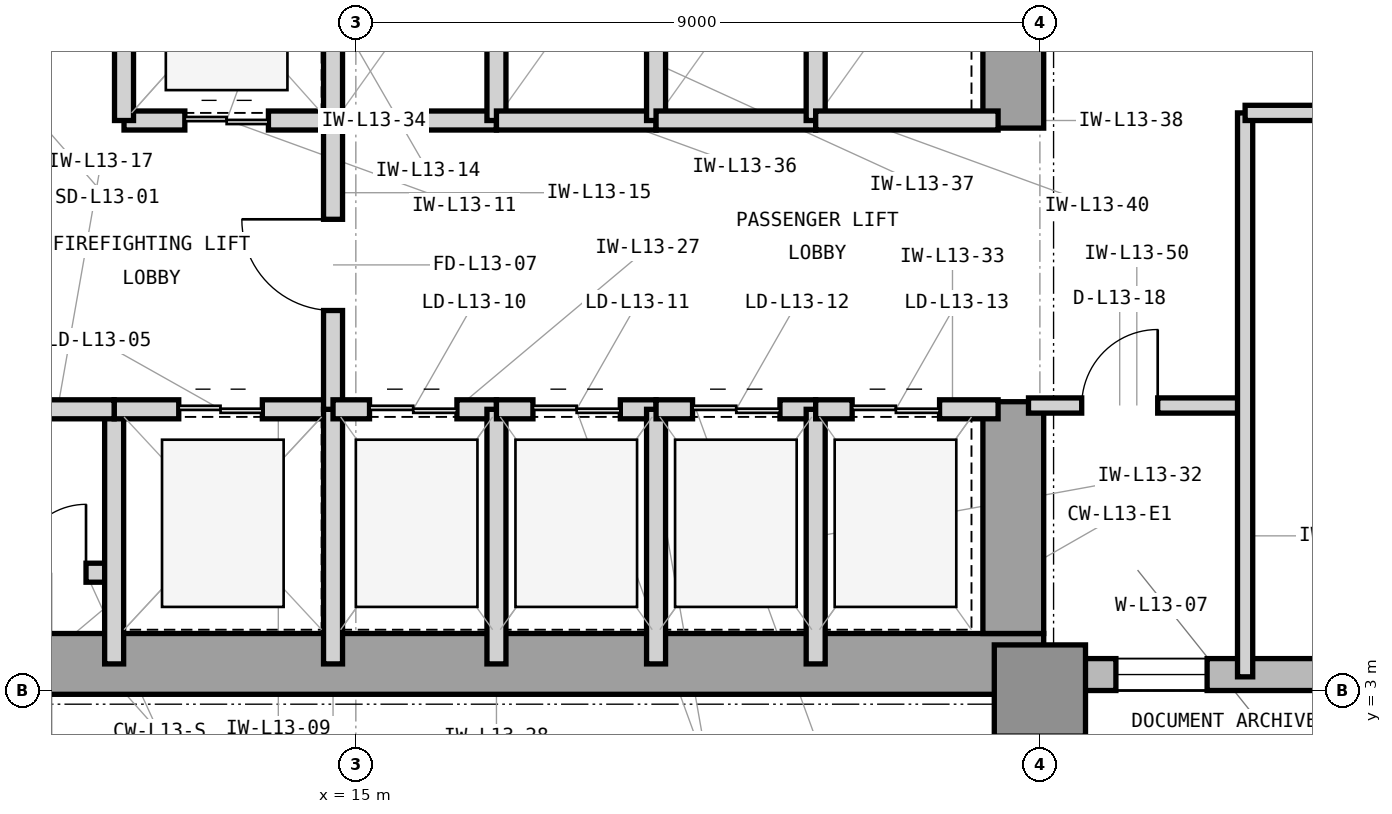
"""IFC4 building model, lengths in metres.
Left out: names, types, materials, properties, quantities, classifications, styles, units other than length and angle.
Written with IfcOpenShell. Run it as: python <this file> out.ifc"""

import sys

from ifc_helpers import new_model, si_unit, direction, frame, frame_2d, origin, origin_2d, place, context, subcontext, project, spatial, rectangle, extrude, element, fill, save


model = new_model("IFC4")
c1 = context("Model", 3, precision=1e-05, world=origin(), true_north=direction((0.0, 1.0)))
c2 = subcontext(c1, "Body", "Model", "MODEL_VIEW")
j1 = project(units=[si_unit("LENGTHUNIT", "METRE"), si_unit("PLANEANGLEUNIT", "RADIAN")], contexts=[c1])
p1 = place(None, origin())
s1 = spatial("IfcSite", under=j1, at=p1, CompositionType="ELEMENT")
p2 = place(p1, origin())
s2 = spatial("IfcBuilding", under=s1, at=p2, CompositionType="ELEMENT")
p3 = place(p2, frame((0.0, 0.0, 59.4)))
s3 = spatial("IfcBuildingStorey", under=s2, at=p3, CompositionType="ELEMENT", Elevation=59.4)
p4 = place(p3, frame((7.475, 3.35, 0.0), z_axis=(0.0, 0.0, 1.0), x_axis=(1.0, 0.0, 0.0)))
e1 = element("IfcWall", 1, at=p4, inside=s3, PredefinedType="SHEAR", context=c2, shape_type="SweptSolid", body=[
    extrude(rectangle(XDim=16.575, YDim=0.8, at=frame_2d((8.288, 0.0))), origin(), (0.0, 0.0, 1.0), 4.2),
])
p5 = place(p3, frame((23.65, 3.75, 0.0), z_axis=(0.0, 0.0, 1.0), x_axis=(0.0, 1.0, 0.0)))
e2 = element("IfcWall", 2, at=p5, inside=s3, PredefinedType="SHEAR", context=c2, shape_type="SweptSolid", body=[
    extrude(rectangle(XDim=3.05, YDim=0.8, at=frame_2d((1.525, 0.0))), origin(), (0.0, 0.0, 1.0), 4.2),
])
p6 = place(p3, frame((23.65, 10.4, 0.0), z_axis=(0.0, 0.0, 1.0), x_axis=(0.0, 1.0, 0.0)))
e3 = element("IfcWall", 3, at=p6, inside=s3, PredefinedType="SHEAR", context=c2, shape_type="SweptSolid", body=[
    extrude(rectangle(XDim=3.2, YDim=0.8, at=frame_2d((1.6, 0.0))), origin(), (0.0, 0.0, 1.0), 4.2),
])
p7 = place(p3, frame((24.0, 3.0, 0.0), z_axis=(0.0, 0.0, 1.0), x_axis=(1.0, 0.0, 0.0)))
e4 = element("IfcColumn", 4, at=p7, inside=s3, PredefinedType="COLUMN", context=c2, shape_type="SweptSolid", body=[
    extrude(rectangle(XDim=1.2, YDim=1.2, at=origin_2d()), origin(), (0.0, 0.0, 1.0), 4.2),
])
p8 = place(p3, frame((23.9, 3.21, 0.0), z_axis=(0.0, 0.0, 1.0), x_axis=(1.0, 0.0, 0.0)))
e5 = element("IfcWall", 5, at=p8, inside=s3, PredefinedType="STANDARD", context=c2, shape_type="SweptSolid", body=[
    extrude(rectangle(XDim=40.5, YDim=0.42, at=frame_2d((20.25, 0.0))), origin(), (0.0, 0.0, 1.0), 3.98),
])
p9 = place(p8, frame((1.1, 0.0, 0.85)))
e6 = element("IfcOpeningElement", 6, at=p9, cuts=e5, PredefinedType="OPENING", context=c2, shape_type="SweptSolid", body=[
    extrude(rectangle(XDim=1.2, YDim=2.45, at=frame_2d((0.6, 1.225))), frame((0.0, 0.22, 0.0), z_axis=(0.0, -1.0, 0.0), x_axis=(1.0, 0.0, 0.0)), (0.0, 0.0, 1.0), 0.44),
])
p10 = place(p8, frame((5.336, 0.0, 0.85)))
e7 = element("IfcOpeningElement", 7, at=p10, cuts=e5, PredefinedType="OPENING", context=c2, shape_type="SweptSolid", body=[
    extrude(rectangle(XDim=2.8, YDim=2.45, at=frame_2d((1.4, 1.225))), frame((0.0, 0.22, 0.0), z_axis=(0.0, -1.0, 0.0), x_axis=(1.0, 0.0, 0.0)), (0.0, 0.0, 1.0), 0.44),
])
p11 = place(p8, frame((19.086, 0.0, 0.85)))
e8 = element("IfcOpeningElement", 8, at=p11, cuts=e5, PredefinedType="OPENING", context=c2, shape_type="SweptSolid", body=[
    extrude(rectangle(XDim=2.8, YDim=2.45, at=frame_2d((1.4, 1.225))), frame((0.0, 0.22, 0.0), z_axis=(0.0, -1.0, 0.0), x_axis=(1.0, 0.0, 0.0)), (0.0, 0.0, 1.0), 0.44),
])
p12 = place(p8, frame((27.886, 0.0, 0.85)))
e9 = element("IfcOpeningElement", 9, at=p12, cuts=e5, PredefinedType="OPENING", context=c2, shape_type="SweptSolid", body=[
    extrude(rectangle(XDim=1.2, YDim=2.45, at=frame_2d((0.6, 1.225))), frame((0.0, 0.22, 0.0), z_axis=(0.0, -1.0, 0.0), x_axis=(1.0, 0.0, 0.0)), (0.0, 0.0, 1.0), 0.44),
])
p13 = place(p3, frame((10.33, 4.55, 0.0), z_axis=(0.0, 0.0, 1.0), x_axis=(1.0, 0.0, 0.0)))
e10 = element("IfcWall", 10, at=p13, inside=s3, PredefinedType="PARTITIONING", context=c2, shape_type="SweptSolid", body=[
    extrude(rectangle(XDim=1.49, YDim=0.25, at=frame_2d((0.745, 0.0))), origin(), (0.0, 0.0, 1.0), 3.97),
])
p14 = place(p13, frame((0.22, 0.0, 0.0)))
e11 = element("IfcOpeningElement", 11, at=p14, cuts=e10, PredefinedType="OPENING", context=c2, shape_type="SweptSolid", body=[
    extrude(rectangle(XDim=0.9, YDim=2.1, at=frame_2d((0.45, 1.05))), frame((0.0, 0.135, 0.0), z_axis=(0.0, -1.0, 0.0), x_axis=(1.0, 0.0, 0.0)), (0.0, 0.0, 1.0), 0.27),
])
p15 = place(p3, frame((11.82, 3.35, 0.0), z_axis=(0.0, 0.0, 1.0), x_axis=(0.0, 1.0, 0.0)))
e12 = element("IfcWall", 12, at=p15, inside=s3, PredefinedType="PARTITIONING", context=c2, shape_type="SweptSolid", body=[
    extrude(rectangle(XDim=3.35, YDim=0.25, at=frame_2d((1.675, 0.0))), origin(), (0.0, 0.0, 1.0), 3.97),
])
p16 = place(p3, frame((11.82, 6.7, 0.0), z_axis=(0.0, 0.0, 1.0), x_axis=(1.0, 0.0, 0.0)))
e13 = element("IfcWall", 13, at=p16, inside=s3, PredefinedType="PARTITIONING", context=c2, shape_type="SweptSolid", body=[
    extrude(rectangle(XDim=2.88, YDim=0.25, at=frame_2d((1.44, 0.0))), origin(), (0.0, 0.0, 1.0), 3.426),
])
p17 = place(p16, frame((0.85, 0.0, 0.0)))
e14 = element("IfcOpeningElement", 14, at=p17, cuts=e13, PredefinedType="OPENING", context=c2, shape_type="SweptSolid", body=[
    extrude(rectangle(XDim=1.1, YDim=2.25, at=frame_2d((0.55, 1.125))), frame((0.0, 0.135, 0.0), z_axis=(0.0, -1.0, 0.0), x_axis=(1.0, 0.0, 0.0)), (0.0, 0.0, 1.0), 0.27),
])
p18 = place(p3, frame((14.7, 3.35, 0.0), z_axis=(0.0, 0.0, 1.0), x_axis=(0.0, 1.0, 0.0)))
e15 = element("IfcWall", 15, at=p18, inside=s3, PredefinedType="PARTITIONING", context=c2, shape_type="SweptSolid", body=[
    extrude(rectangle(XDim=3.35, YDim=0.25, at=frame_2d((1.675, 0.0))), origin(), (0.0, 0.0, 1.0), 3.97),
])
p19 = place(p3, frame((11.95, 10.5, 0.0), z_axis=(0.0, 0.0, 1.0), x_axis=(1.0, 0.0, 0.0)))
e16 = element("IfcWall", 16, at=p19, inside=s3, PredefinedType="PARTITIONING", context=c2, shape_type="SweptSolid", body=[
    extrude(rectangle(XDim=2.75, YDim=0.25, at=frame_2d((1.375, 0.0))), origin(), (0.0, 0.0, 1.0), 3.426),
])
p20 = place(p19, frame((0.8, 0.0, 0.0)))
e17 = element("IfcOpeningElement", 17, at=p20, cuts=e16, PredefinedType="OPENING", context=c2, shape_type="SweptSolid", body=[
    extrude(rectangle(XDim=1.1, YDim=2.25, at=frame_2d((0.55, 1.125))), frame((0.0, 0.135, 0.0), z_axis=(0.0, -1.0, 0.0), x_axis=(1.0, 0.0, 0.0)), (0.0, 0.0, 1.0), 0.27),
])
for number, where, z_axis, x_axis in (
    (18, (11.95, 10.5, 0.0), (0.0, 0.0, 1.0), (0.0, 1.0, 0.0)),
    (19, (14.7, 10.5, 0.0), (0.0, 0.0, 1.0), (0.0, 1.0, 0.0)),
):
    element("IfcWall", number, at=place(p3, frame(where, z_axis=z_axis, x_axis=x_axis)), inside=s3, PredefinedType="PARTITIONING", context=c2, shape_type="SweptSolid", body=[
        extrude(rectangle(XDim=3.0, YDim=0.25, at=frame_2d((1.5, 0.0))), origin(), (0.0, 0.0, 1.0), 3.97),
    ])
p21 = place(p3, frame((14.7, 6.7, 0.0), z_axis=(0.0, 0.0, 1.0), x_axis=(0.0, 1.0, 0.0)))
e20 = element("IfcWall", 20, at=p21, inside=s3, PredefinedType="PARTITIONING", context=c2, shape_type="SweptSolid", body=[
    extrude(rectangle(XDim=3.8, YDim=0.25, at=frame_2d((1.9, 0.0))), origin(), (0.0, 0.0, 1.0), 3.97),
])
p22 = place(p21, frame((1.3, 0.0, 0.0)))
e21 = element("IfcOpeningElement", 21, at=p22, cuts=e20, PredefinedType="OPENING", context=c2, shape_type="SweptSolid", body=[
    extrude(rectangle(XDim=1.2, YDim=2.2, at=frame_2d((0.6, 1.1))), frame((0.0, 0.135, 0.0), z_axis=(0.0, -1.0, 0.0), x_axis=(1.0, 0.0, 0.0)), (0.0, 0.0, 1.0), 0.27),
])
p23 = place(p3, frame((10.33, 6.7, 0.0), z_axis=(0.0, 0.0, 1.0), x_axis=(1.0, 0.0, 0.0)))
e22 = element("IfcWall", 22, at=p23, inside=s3, PredefinedType="PARTITIONING", context=c2, shape_type="SweptSolid", body=[
    extrude(rectangle(XDim=1.49, YDim=0.25, at=frame_2d((0.745, 0.0))), origin(), (0.0, 0.0, 1.0), 3.426),
])
p24 = place(p3, frame((14.7, 6.7, 0.0), z_axis=(0.0, 0.0, 1.0), x_axis=(1.0, 0.0, 0.0)))
e23 = element("IfcWall", 23, at=p24, inside=s3, PredefinedType="PARTITIONING", context=c2, shape_type="SweptSolid", body=[
    extrude(rectangle(XDim=2.15, YDim=0.25, at=frame_2d((1.075, 0.0))), origin(), (0.0, 0.0, 1.0), 3.426),
])
p25 = place(p24, frame((0.48, 0.0, 0.0)))
e24 = element("IfcOpeningElement", 24, at=p25, cuts=e23, PredefinedType="OPENING", context=c2, shape_type="SweptSolid", body=[
    extrude(rectangle(XDim=1.15, YDim=2.25, at=frame_2d((0.575, 1.125))), frame((0.0, 0.135, 0.0), z_axis=(0.0, -1.0, 0.0), x_axis=(1.0, 0.0, 0.0)), (0.0, 0.0, 1.0), 0.27),
])
p26 = place(p3, frame((16.85, 3.35, 0.0), z_axis=(0.0, 0.0, 1.0), x_axis=(0.0, 1.0, 0.0)))
e25 = element("IfcWall", 25, at=p26, inside=s3, PredefinedType="PARTITIONING", context=c2, shape_type="SweptSolid", body=[
    extrude(rectangle(XDim=3.35, YDim=0.25, at=frame_2d((1.675, 0.0))), origin(), (0.0, 0.0, 1.0), 3.97),
])
p27 = place(p3, frame((16.85, 6.7, 0.0), z_axis=(0.0, 0.0, 1.0), x_axis=(1.0, 0.0, 0.0)))
e26 = element("IfcWall", 26, at=p27, inside=s3, PredefinedType="PARTITIONING", context=c2, shape_type="SweptSolid", body=[
    extrude(rectangle(XDim=2.1, YDim=0.25, at=frame_2d((1.05, 0.0))), origin(), (0.0, 0.0, 1.0), 3.426),
])
p28 = place(p27, frame((0.48, 0.0, 0.0)))
e27 = element("IfcOpeningElement", 27, at=p28, cuts=e26, PredefinedType="OPENING", context=c2, shape_type="SweptSolid", body=[
    extrude(rectangle(XDim=1.15, YDim=2.25, at=frame_2d((0.575, 1.125))), frame((0.0, 0.135, 0.0), z_axis=(0.0, -1.0, 0.0), x_axis=(1.0, 0.0, 0.0)), (0.0, 0.0, 1.0), 0.27),
])
p29 = place(p3, frame((18.95, 3.35, 0.0), z_axis=(0.0, 0.0, 1.0), x_axis=(0.0, 1.0, 0.0)))
e28 = element("IfcWall", 28, at=p29, inside=s3, PredefinedType="PARTITIONING", context=c2, shape_type="SweptSolid", body=[
    extrude(rectangle(XDim=3.35, YDim=0.25, at=frame_2d((1.675, 0.0))), origin(), (0.0, 0.0, 1.0), 3.97),
])
p30 = place(p3, frame((18.95, 6.7, 0.0), z_axis=(0.0, 0.0, 1.0), x_axis=(1.0, 0.0, 0.0)))
e29 = element("IfcWall", 29, at=p30, inside=s3, PredefinedType="PARTITIONING", context=c2, shape_type="SweptSolid", body=[
    extrude(rectangle(XDim=2.1, YDim=0.25, at=frame_2d((1.05, 0.0))), origin(), (0.0, 0.0, 1.0), 3.426),
])
p31 = place(p30, frame((0.48, 0.0, 0.0)))
e30 = element("IfcOpeningElement", 30, at=p31, cuts=e29, PredefinedType="OPENING", context=c2, shape_type="SweptSolid", body=[
    extrude(rectangle(XDim=1.15, YDim=2.25, at=frame_2d((0.575, 1.125))), frame((0.0, 0.135, 0.0), z_axis=(0.0, -1.0, 0.0), x_axis=(1.0, 0.0, 0.0)), (0.0, 0.0, 1.0), 0.27),
])
p32 = place(p3, frame((21.05, 3.35, 0.0), z_axis=(0.0, 0.0, 1.0), x_axis=(0.0, 1.0, 0.0)))
e31 = element("IfcWall", 31, at=p32, inside=s3, PredefinedType="PARTITIONING", context=c2, shape_type="SweptSolid", body=[
    extrude(rectangle(XDim=3.35, YDim=0.25, at=frame_2d((1.675, 0.0))), origin(), (0.0, 0.0, 1.0), 3.97),
])
p33 = place(p3, frame((21.05, 6.7, 0.0), z_axis=(0.0, 0.0, 1.0), x_axis=(1.0, 0.0, 0.0)))
e32 = element("IfcWall", 32, at=p33, inside=s3, PredefinedType="PARTITIONING", context=c2, shape_type="SweptSolid", body=[
    extrude(rectangle(XDim=2.4, YDim=0.25, at=frame_2d((1.2, 0.0))), origin(), (0.0, 0.0, 1.0), 3.426),
])
p34 = place(p33, frame((0.48, 0.0, 0.0)))
e33 = element("IfcOpeningElement", 33, at=p34, cuts=e32, PredefinedType="OPENING", context=c2, shape_type="SweptSolid", body=[
    extrude(rectangle(XDim=1.15, YDim=2.25, at=frame_2d((0.575, 1.125))), frame((0.0, 0.135, 0.0), z_axis=(0.0, -1.0, 0.0), x_axis=(1.0, 0.0, 0.0)), (0.0, 0.0, 1.0), 0.27),
])
p35 = place(p3, frame((14.7, 10.5, 0.0), z_axis=(0.0, 0.0, 1.0), x_axis=(1.0, 0.0, 0.0)))
e34 = element("IfcWall", 34, at=p35, inside=s3, PredefinedType="PARTITIONING", context=c2, shape_type="SweptSolid", body=[
    extrude(rectangle(XDim=2.15, YDim=0.25, at=frame_2d((1.075, 0.0))), origin(), (0.0, 0.0, 1.0), 3.426),
])
p36 = place(p3, frame((16.85, 10.5, 0.0), z_axis=(0.0, 0.0, 1.0), x_axis=(0.0, 1.0, 0.0)))
e35 = element("IfcWall", 35, at=p36, inside=s3, PredefinedType="PARTITIONING", context=c2, shape_type="SweptSolid", body=[
    extrude(rectangle(XDim=3.0, YDim=0.25, at=frame_2d((1.5, 0.0))), origin(), (0.0, 0.0, 1.0), 3.97),
])
p37 = place(p3, frame((16.85, 10.5, 0.0), z_axis=(0.0, 0.0, 1.0), x_axis=(1.0, 0.0, 0.0)))
e36 = element("IfcWall", 36, at=p37, inside=s3, PredefinedType="PARTITIONING", context=c2, shape_type="SweptSolid", body=[
    extrude(rectangle(XDim=2.1, YDim=0.25, at=frame_2d((1.05, 0.0))), origin(), (0.0, 0.0, 1.0), 3.426),
])
p38 = place(p3, frame((18.95, 10.5, 0.0), z_axis=(0.0, 0.0, 1.0), x_axis=(0.0, 1.0, 0.0)))
e37 = element("IfcWall", 37, at=p38, inside=s3, PredefinedType="PARTITIONING", context=c2, shape_type="SweptSolid", body=[
    extrude(rectangle(XDim=3.0, YDim=0.25, at=frame_2d((1.5, 0.0))), origin(), (0.0, 0.0, 1.0), 3.97),
])
p39 = place(p3, frame((18.95, 10.5, 0.0), z_axis=(0.0, 0.0, 1.0), x_axis=(1.0, 0.0, 0.0)))
e38 = element("IfcWall", 38, at=p39, inside=s3, PredefinedType="PARTITIONING", context=c2, shape_type="SweptSolid", body=[
    extrude(rectangle(XDim=2.1, YDim=0.25, at=frame_2d((1.05, 0.0))), origin(), (0.0, 0.0, 1.0), 3.426),
])
p40 = place(p3, frame((21.05, 10.5, 0.0), z_axis=(0.0, 0.0, 1.0), x_axis=(0.0, 1.0, 0.0)))
e39 = element("IfcWall", 39, at=p40, inside=s3, PredefinedType="PARTITIONING", context=c2, shape_type="SweptSolid", body=[
    extrude(rectangle(XDim=3.0, YDim=0.25, at=frame_2d((1.5, 0.0))), origin(), (0.0, 0.0, 1.0), 3.97),
])
p41 = place(p3, frame((21.05, 10.5, 0.0), z_axis=(0.0, 0.0, 1.0), x_axis=(1.0, 0.0, 0.0)))
e40 = element("IfcWall", 40, at=p41, inside=s3, PredefinedType="PARTITIONING", context=c2, shape_type="SweptSolid", body=[
    extrude(rectangle(XDim=2.4, YDim=0.25, at=frame_2d((1.2, 0.0))), origin(), (0.0, 0.0, 1.0), 3.426),
])
p42 = place(p3, frame((23.85, 6.75, 0.0), z_axis=(0.0, 0.0, 1.0), x_axis=(1.0, 0.0, 0.0)))
e41 = element("IfcWall", 41, at=p42, inside=s3, PredefinedType="PARTITIONING", context=c2, shape_type="SweptSolid", body=[
    extrude(rectangle(XDim=2.85, YDim=0.2, at=frame_2d((1.425, 0.0))), origin(), (0.0, 0.0, 1.0), 3.97),
])
p43 = place(p42, frame((0.7, 0.0, 0.0)))
e42 = element("IfcOpeningElement", 42, at=p43, cuts=e41, PredefinedType="OPENING", context=c2, shape_type="SweptSolid", body=[
    extrude(rectangle(XDim=1.0, YDim=2.15, at=frame_2d((0.5, 1.075))), frame((0.0, 0.11, 0.0), z_axis=(0.0, -1.0, 0.0), x_axis=(1.0, 0.0, 0.0)), (0.0, 0.0, 1.0), 0.22),
])
p44 = place(p3, frame((26.7, 3.18, 0.0), z_axis=(0.0, 0.0, 1.0), x_axis=(0.0, 1.0, 0.0)))
e43 = element("IfcWall", 43, at=p44, inside=s3, PredefinedType="PARTITIONING", context=c2, shape_type="SweptSolid", body=[
    extrude(rectangle(XDim=7.42, YDim=0.2, at=frame_2d((3.71, 0.0))), origin(), (0.0, 0.0, 1.0), 3.97),
])
p45 = place(p3, frame((26.7, 10.6, 0.0), z_axis=(0.0, 0.0, 1.0), x_axis=(1.0, 0.0, 0.0)))
e44 = element("IfcWall", 44, at=p45, inside=s3, PredefinedType="PARTITIONING", context=c2, shape_type="SweptSolid", body=[
    extrude(rectangle(XDim=12.0, YDim=0.2, at=frame_2d((6.0, 0.0))), origin(), (0.0, 0.0, 1.0), 3.97),
])
p46 = place(p45, frame((5.0, 0.0, 0.0)))
e45 = element("IfcOpeningElement", 45, at=p46, cuts=e44, PredefinedType="OPENING", context=c2, shape_type="SweptSolid", body=[
    extrude(rectangle(XDim=2.0, YDim=2.5, at=frame_2d((1.0, 1.25))), frame((0.0, 0.11, 0.0), z_axis=(0.0, -1.0, 0.0), x_axis=(1.0, 0.0, 0.0)), (0.0, 0.0, 1.0), 0.22),
])
p47 = place(p14, origin())
e46 = element("IfcDoor", 46, at=p47, inside=s3, OperationType="SINGLE_SWING_RIGHT", PredefinedType="TRAPDOOR", context=c2, shape_type="SweptSolid", body=[
    extrude(rectangle(XDim=0.9, YDim=2.1, at=frame_2d((0.45, 1.05))), frame((0.0, 0.025, 0.0), z_axis=(0.0, -1.0, 0.0), x_axis=(1.0, 0.0, 0.0)), (0.0, 0.0, 1.0), 0.05),
])
fill(e11, e46)
p48 = place(p17, origin())
e47 = element("IfcDoor", 47, at=p48, inside=s3, OperationType="DOUBLE_DOOR_SLIDING", PredefinedType="DOOR", context=c2, shape_type="SweptSolid", body=[
    extrude(rectangle(XDim=1.1, YDim=2.25, at=frame_2d((0.55, 1.125))), frame((0.0, 0.025, 0.0), z_axis=(0.0, -1.0, 0.0), x_axis=(1.0, 0.0, 0.0)), (0.0, 0.0, 1.0), 0.05),
])
fill(e14, e47)
p49 = place(p20, origin())
e48 = element("IfcDoor", 48, at=p49, inside=s3, OperationType="DOUBLE_DOOR_SLIDING", PredefinedType="DOOR", context=c2, shape_type="SweptSolid", body=[
    extrude(rectangle(XDim=1.1, YDim=2.25, at=frame_2d((0.55, 1.125))), frame((0.0, 0.025, 0.0), z_axis=(0.0, -1.0, 0.0), x_axis=(1.0, 0.0, 0.0)), (0.0, 0.0, 1.0), 0.05),
])
fill(e17, e48)
p50 = place(p22, origin())
e49 = element("IfcDoor", 49, at=p50, inside=s3, OperationType="SINGLE_SWING_RIGHT", PredefinedType="DOOR", context=c2, shape_type="SweptSolid", body=[
    extrude(rectangle(XDim=1.2, YDim=2.2, at=frame_2d((0.6, 1.1))), frame((0.0, 0.025, 0.0), z_axis=(0.0, -1.0, 0.0), x_axis=(1.0, 0.0, 0.0)), (0.0, 0.0, 1.0), 0.05),
])
fill(e21, e49)
p51 = place(p25, origin())
e50 = element("IfcDoor", 50, at=p51, inside=s3, OperationType="DOUBLE_DOOR_SLIDING", PredefinedType="DOOR", context=c2, shape_type="SweptSolid", body=[
    extrude(rectangle(XDim=1.15, YDim=2.25, at=frame_2d((0.575, 1.125))), frame((0.0, 0.025, 0.0), z_axis=(0.0, -1.0, 0.0), x_axis=(1.0, 0.0, 0.0)), (0.0, 0.0, 1.0), 0.05),
])
fill(e24, e50)
p52 = place(p28, origin())
e51 = element("IfcDoor", 51, at=p52, inside=s3, OperationType="DOUBLE_DOOR_SLIDING", PredefinedType="DOOR", context=c2, shape_type="SweptSolid", body=[
    extrude(rectangle(XDim=1.15, YDim=2.25, at=frame_2d((0.575, 1.125))), frame((0.0, 0.025, 0.0), z_axis=(0.0, -1.0, 0.0), x_axis=(1.0, 0.0, 0.0)), (0.0, 0.0, 1.0), 0.05),
])
fill(e27, e51)
p53 = place(p31, origin())
e52 = element("IfcDoor", 52, at=p53, inside=s3, OperationType="DOUBLE_DOOR_SLIDING", PredefinedType="DOOR", context=c2, shape_type="SweptSolid", body=[
    extrude(rectangle(XDim=1.15, YDim=2.25, at=frame_2d((0.575, 1.125))), frame((0.0, 0.025, 0.0), z_axis=(0.0, -1.0, 0.0), x_axis=(1.0, 0.0, 0.0)), (0.0, 0.0, 1.0), 0.05),
])
fill(e30, e52)
p54 = place(p34, origin())
e53 = element("IfcDoor", 53, at=p54, inside=s3, OperationType="DOUBLE_DOOR_SLIDING", PredefinedType="DOOR", context=c2, shape_type="SweptSolid", body=[
    extrude(rectangle(XDim=1.15, YDim=2.25, at=frame_2d((0.575, 1.125))), frame((0.0, 0.025, 0.0), z_axis=(0.0, -1.0, 0.0), x_axis=(1.0, 0.0, 0.0)), (0.0, 0.0, 1.0), 0.05),
])
fill(e33, e53)
p55 = place(p43, origin())
e54 = element("IfcDoor", 54, at=p55, inside=s3, OperationType="SINGLE_SWING_RIGHT", PredefinedType="DOOR", context=c2, shape_type="SweptSolid", body=[
    extrude(rectangle(XDim=1.0, YDim=2.15, at=frame_2d((0.5, 1.075))), frame((0.0, 0.025, 0.0), z_axis=(0.0, -1.0, 0.0), x_axis=(1.0, 0.0, 0.0)), (0.0, 0.0, 1.0), 0.05),
])
fill(e42, e54)
p56 = place(p9, origin())
e55 = element("IfcWindow", 55, at=p56, inside=s3, PartitioningType="SINGLE_PANEL", PredefinedType="WINDOW", context=c2, shape_type="SweptSolid", body=[
    extrude(rectangle(XDim=1.2, YDim=2.45, at=frame_2d((0.6, 1.225))), frame((0.0, 0.11, 0.0), z_axis=(0.0, -1.0, 0.0), x_axis=(1.0, 0.0, 0.0)), (0.0, 0.0, 1.0), 0.06),
])
fill(e6, e55)
save(model, sys.argv[1])
